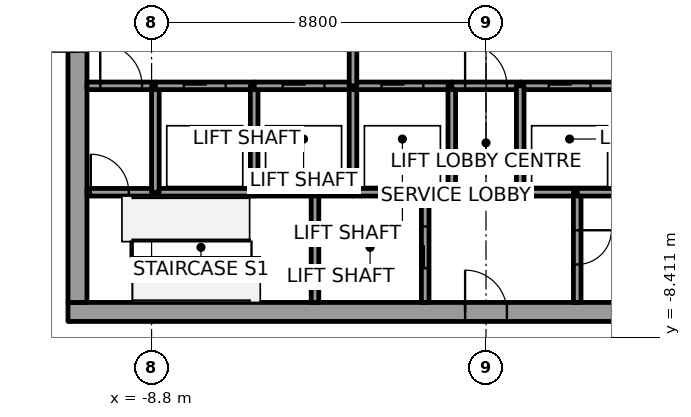
"""IFC4 building model, lengths in metres.
Left out: names, types, materials, properties, quantities, classifications, styles, units other than length and angle.
Written with IfcOpenShell. Run it as: python <this file> out.ifc"""

import sys

from ifc_helpers import new_model, si_unit, direction, frame, frame_2d, origin, place, context, subcontext, project, spatial, rectangle, extrude, element, fill, save


model = new_model("IFC4")
c1 = context("Model", 3, precision=1e-05, world=origin(), true_north=direction((0.0, 1.0)))
c2 = subcontext(c1, "Body", "Model", "MODEL_VIEW")
j1 = project(units=[si_unit("LENGTHUNIT", "METRE"), si_unit("PLANEANGLEUNIT", "RADIAN")], contexts=[c1])
p1 = place(None, origin())
s1 = spatial("IfcSite", under=j1, at=p1, CompositionType="ELEMENT")
p2 = place(p1, origin())
s2 = spatial("IfcBuilding", under=s1, at=p2, CompositionType="ELEMENT")
p3 = place(p2, frame((0.0, 0.0, 133.8)))
s3 = spatial("IfcBuildingStorey", under=s2, at=p3, CompositionType="ELEMENT", Elevation=133.8)
p4 = place(p3, frame((-11.0, -7.75, 0.0), z_axis=(0.0, 0.0, 1.0), x_axis=(1.0, 0.0, 0.0)))
e1 = element("IfcWall", 1, at=p4, inside=s3, PredefinedType="SHEAR", context=c2, shape_type="SweptSolid", body=[
    extrude(rectangle(XDim=22.0, YDim=0.5, at=frame_2d((11.0, 0.0))), origin(), (0.0, 0.0, 1.0), 4.0),
])
p5 = place(p4, frame((10.45, 0.0, 0.0)))
e2 = element("IfcOpeningElement", 2, at=p5, cuts=e1, PredefinedType="OPENING", context=c2, shape_type="SweptSolid", body=[
    extrude(rectangle(XDim=1.1, YDim=2.1, at=frame_2d((0.55, 1.05))), frame((0.0, 0.25, 0.0), z_axis=(0.0, -1.0, 0.0), x_axis=(1.0, 0.0, 0.0)), (0.0, 0.0, 1.0), 0.5),
])
p6 = place(p3, frame((-10.75, -7.5, 0.0), z_axis=(0.0, 0.0, 1.0), x_axis=(0.0, 1.0, 0.0)))
e3 = element("IfcWall", 3, at=p6, inside=s3, PredefinedType="SHEAR", context=c2, shape_type="SweptSolid", body=[
    extrude(rectangle(XDim=15.0, YDim=0.5, at=frame_2d((7.5, 0.0))), origin(), (0.0, 0.0, 1.0), 4.0),
])
p7 = place(p6, frame((6.6, 0.0, 0.0)))
e4 = element("IfcOpeningElement", 4, at=p7, cuts=e3, PredefinedType="OPENING", context=c2, shape_type="SweptSolid", body=[
    extrude(rectangle(XDim=1.8, YDim=2.1, at=frame_2d((0.9, 1.05))), frame((0.0, 0.25, 0.0), z_axis=(0.0, -1.0, 0.0), x_axis=(1.0, 0.0, 0.0)), (0.0, 0.0, 1.0), 0.5),
])
p8 = place(p3, frame((-10.5, -4.6, 0.0), z_axis=(0.0, 0.0, 1.0), x_axis=(1.0, 0.0, 0.0)))
e5 = element("IfcWall", 5, at=p8, inside=s3, PredefinedType="SOLIDWALL", context=c2, shape_type="SweptSolid", body=[
    extrude(rectangle(XDim=1.8, YDim=0.2, at=frame_2d((0.9, 0.0))), origin(), (0.0, 0.0, 1.0), 3.85),
])
p9 = place(p8, frame((0.1, 0.0, 0.0)))
e6 = element("IfcOpeningElement", 6, at=p9, cuts=e5, PredefinedType="OPENING", context=c2, shape_type="SweptSolid", body=[
    extrude(rectangle(XDim=1.0, YDim=2.1, at=frame_2d((0.5, 1.05))), frame((0.0, 0.1, 0.0), z_axis=(0.0, -1.0, 0.0), x_axis=(1.0, 0.0, 0.0)), (0.0, 0.0, 1.0), 0.2),
])
p10 = place(p3, frame((-10.5, -1.8, 0.0), z_axis=(0.0, 0.0, 1.0), x_axis=(1.0, 0.0, 0.0)))
e7 = element("IfcWall", 7, at=p10, inside=s3, PredefinedType="SOLIDWALL", context=c2, shape_type="SweptSolid", body=[
    extrude(rectangle(XDim=1.8, YDim=0.2, at=frame_2d((0.9, 0.0))), origin(), (0.0, 0.0, 1.0), 3.85),
])
p11 = place(p10, frame((0.35, 0.0, 0.0)))
e8 = element("IfcOpeningElement", 8, at=p11, cuts=e7, PredefinedType="OPENING", context=c2, shape_type="SweptSolid", body=[
    extrude(rectangle(XDim=1.1, YDim=2.1, at=frame_2d((0.55, 1.05))), frame((0.0, 0.1, 0.0), z_axis=(0.0, -1.0, 0.0), x_axis=(1.0, 0.0, 0.0)), (0.0, 0.0, 1.0), 0.2),
])
p12 = place(p3, frame((-8.7, -4.6, 0.0), z_axis=(0.0, 0.0, 1.0), x_axis=(1.0, 0.0, 0.0)))
e9 = element("IfcWall", 9, at=p12, inside=s3, PredefinedType="SOLIDWALL", context=c2, shape_type="SweptSolid", body=[
    extrude(rectangle(XDim=2.6, YDim=0.2, at=frame_2d((1.3, 0.0))), origin(), (0.0, 0.0, 1.0), 3.85),
])
p13 = place(p3, frame((-8.7, -4.6, 0.0), z_axis=(0.0, 0.0, 1.0), x_axis=(0.0, 1.0, 0.0)))
e10 = element("IfcWall", 10, at=p13, inside=s3, PredefinedType="SOLIDWALL", context=c2, shape_type="SweptSolid", body=[
    extrude(rectangle(XDim=2.8, YDim=0.2, at=frame_2d((1.4, 0.0))), origin(), (0.0, 0.0, 1.0), 3.85),
])
p14 = place(p3, frame((-8.7, -1.8, 0.0), z_axis=(0.0, 0.0, 1.0), x_axis=(1.0, 0.0, 0.0)))
e11 = element("IfcWall", 11, at=p14, inside=s3, PredefinedType="SOLIDWALL", context=c2, shape_type="SweptSolid", body=[
    extrude(rectangle(XDim=2.6, YDim=0.2, at=frame_2d((1.3, 0.0))), origin(), (0.0, 0.0, 1.0), 3.85),
])
p15 = place(p14, frame((0.75, 0.0, 0.0)))
e12 = element("IfcOpeningElement", 12, at=p15, cuts=e11, PredefinedType="OPENING", context=c2, shape_type="SweptSolid", body=[
    extrude(rectangle(XDim=1.1, YDim=2.1, at=frame_2d((0.55, 1.05))), frame((0.0, 0.1, 0.0), z_axis=(0.0, -1.0, 0.0), x_axis=(1.0, 0.0, 0.0)), (0.0, 0.0, 1.0), 0.2),
])
p16 = place(p3, frame((-6.1, -4.6, 0.0), z_axis=(0.0, 0.0, 1.0), x_axis=(1.0, 0.0, 0.0)))
e13 = element("IfcWall", 13, at=p16, inside=s3, PredefinedType="SOLIDWALL", context=c2, shape_type="SweptSolid", body=[
    extrude(rectangle(XDim=1.6, YDim=0.2, at=frame_2d((0.8, 0.0))), origin(), (0.0, 0.0, 1.0), 3.85),
])
p17 = place(p3, frame((-6.1, -4.6, 0.0), z_axis=(0.0, 0.0, 1.0), x_axis=(0.0, 1.0, 0.0)))
e14 = element("IfcWall", 14, at=p17, inside=s3, PredefinedType="SOLIDWALL", context=c2, shape_type="SweptSolid", body=[
    extrude(rectangle(XDim=2.8, YDim=0.2, at=frame_2d((1.4, 0.0))), origin(), (0.0, 0.0, 1.0), 3.85),
])
p18 = place(p3, frame((-6.1, -1.8, 0.0), z_axis=(0.0, 0.0, 1.0), x_axis=(1.0, 0.0, 0.0)))
e15 = element("IfcWall", 15, at=p18, inside=s3, PredefinedType="SOLIDWALL", context=c2, shape_type="SweptSolid", body=[
    extrude(rectangle(XDim=2.6, YDim=0.2, at=frame_2d((1.3, 0.0))), origin(), (0.0, 0.0, 1.0), 3.85),
])
p19 = place(p18, frame((0.75, 0.0, 0.0)))
e16 = element("IfcOpeningElement", 16, at=p19, cuts=e15, PredefinedType="OPENING", context=c2, shape_type="SweptSolid", body=[
    extrude(rectangle(XDim=1.1, YDim=2.1, at=frame_2d((0.55, 1.05))), frame((0.0, 0.1, 0.0), z_axis=(0.0, -1.0, 0.0), x_axis=(1.0, 0.0, 0.0)), (0.0, 0.0, 1.0), 0.2),
])
p20 = place(p3, frame((-4.5, -4.6, 0.0), z_axis=(0.0, 0.0, 1.0), x_axis=(0.0, -1.0, 0.0)))
e17 = element("IfcWall", 17, at=p20, inside=s3, PredefinedType="SOLIDWALL", context=c2, shape_type="SweptSolid", body=[
    extrude(rectangle(XDim=2.9, YDim=0.2, at=frame_2d((1.45, 0.0))), origin(), (0.0, 0.0, 1.0), 3.85),
])
p21 = place(p3, frame((-4.5, -4.6, 0.0), z_axis=(0.0, 0.0, 1.0), x_axis=(1.0, 0.0, 0.0)))
e18 = element("IfcWall", 18, at=p21, inside=s3, PredefinedType="SOLIDWALL", context=c2, shape_type="SweptSolid", body=[
    extrude(rectangle(XDim=1.0, YDim=0.2, at=frame_2d((0.5, 0.0))), origin(), (0.0, 0.0, 1.0), 3.85),
])
p22 = place(p3, frame((-3.5, -4.6, 0.0), z_axis=(0.0, 0.0, 1.0), x_axis=(1.0, 0.0, 0.0)))
e19 = element("IfcWall", 19, at=p22, inside=s3, PredefinedType="SOLIDWALL", context=c2, shape_type="SweptSolid", body=[
    extrude(rectangle(XDim=1.9, YDim=0.2, at=frame_2d((0.95, 0.0))), origin(), (0.0, 0.0, 1.0), 3.85),
])
p23 = place(p3, frame((-3.5, -4.6, 0.0), z_axis=(0.0, 0.0, 1.0), x_axis=(0.0, 1.0, 0.0)))
e20 = element("IfcWall", 20, at=p23, inside=s3, PredefinedType="SOLIDWALL", context=c2, shape_type="SweptSolid", body=[
    extrude(rectangle(XDim=2.8, YDim=0.2, at=frame_2d((1.4, 0.0))), origin(), (0.0, 0.0, 1.0), 3.85),
])
p24 = place(p3, frame((-3.5, -1.8, 0.0), z_axis=(0.0, 0.0, 1.0), x_axis=(1.0, 0.0, 0.0)))
e21 = element("IfcWall", 21, at=p24, inside=s3, PredefinedType="SOLIDWALL", context=c2, shape_type="SweptSolid", body=[
    extrude(rectangle(XDim=2.6, YDim=0.2, at=frame_2d((1.3, 0.0))), origin(), (0.0, 0.0, 1.0), 3.85),
])
p25 = place(p24, frame((0.75, 0.0, 0.0)))
e22 = element("IfcOpeningElement", 22, at=p25, cuts=e21, PredefinedType="OPENING", context=c2, shape_type="SweptSolid", body=[
    extrude(rectangle(XDim=1.1, YDim=2.1, at=frame_2d((0.55, 1.05))), frame((0.0, 0.1, 0.0), z_axis=(0.0, -1.0, 0.0), x_axis=(1.0, 0.0, 0.0)), (0.0, 0.0, 1.0), 0.2),
])
p26 = place(p3, frame((-3.5, 1.8, 0.0), z_axis=(0.0, 0.0, 1.0), x_axis=(0.0, -1.0, 0.0)))
e23 = element("IfcWall", 23, at=p26, inside=s3, PredefinedType="SOLIDWALL", context=c2, shape_type="SweptSolid", body=[
    extrude(rectangle(XDim=3.6, YDim=0.2, at=frame_2d((1.8, 0.0))), origin(), (0.0, 0.0, 1.0), 3.85),
])
p27 = place(p26, frame((1.05, 0.0, 0.0)))
e24 = element("IfcOpeningElement", 24, at=p27, cuts=e23, PredefinedType="OPENING", context=c2, shape_type="SweptSolid", body=[
    extrude(rectangle(XDim=1.5, YDim=2.1, at=frame_2d((0.75, 1.05))), frame((0.0, 0.1, 0.0), z_axis=(0.0, -1.0, 0.0), x_axis=(1.0, 0.0, 0.0)), (0.0, 0.0, 1.0), 0.2),
])
p28 = place(p3, frame((-1.6, -7.5, 0.0), z_axis=(0.0, 0.0, 1.0), x_axis=(0.0, 1.0, 0.0)))
e25 = element("IfcWall", 25, at=p28, inside=s3, PredefinedType="SOLIDWALL", context=c2, shape_type="SweptSolid", body=[
    extrude(rectangle(XDim=2.9, YDim=0.2, at=frame_2d((1.45, 0.0))), origin(), (0.0, 0.0, 1.0), 3.85),
])
p29 = place(p28, frame((0.9, 0.0, 0.0)))
e26 = element("IfcOpeningElement", 26, at=p29, cuts=e25, PredefinedType="OPENING", context=c2, shape_type="SweptSolid", body=[
    extrude(rectangle(XDim=1.1, YDim=2.1, at=frame_2d((0.55, 1.05))), frame((0.0, 0.1, 0.0), z_axis=(0.0, -1.0, 0.0), x_axis=(1.0, 0.0, 0.0)), (0.0, 0.0, 1.0), 0.2),
])
p30 = place(p3, frame((-1.6, -4.6, 0.0), z_axis=(0.0, 0.0, 1.0), x_axis=(1.0, 0.0, 0.0)))
e27 = element("IfcWall", 27, at=p30, inside=s3, PredefinedType="SOLIDWALL", context=c2, shape_type="SweptSolid", body=[
    extrude(rectangle(XDim=0.7, YDim=0.2, at=frame_2d((0.35, 0.0))), origin(), (0.0, 0.0, 1.0), 3.85),
])
p31 = place(p3, frame((-0.9, -4.6, 0.0), z_axis=(0.0, 0.0, 1.0), x_axis=(0.0, 1.0, 0.0)))
e28 = element("IfcWall", 28, at=p31, inside=s3, PredefinedType="SOLIDWALL", context=c2, shape_type="SweptSolid", body=[
    extrude(rectangle(XDim=2.8, YDim=0.2, at=frame_2d((1.4, 0.0))), origin(), (0.0, 0.0, 1.0), 3.85),
])
p32 = place(p3, frame((-0.9, -1.8, 0.0), z_axis=(0.0, 0.0, 1.0), x_axis=(1.0, 0.0, 0.0)))
e29 = element("IfcWall", 29, at=p32, inside=s3, PredefinedType="SOLIDWALL", context=c2, shape_type="SweptSolid", body=[
    extrude(rectangle(XDim=1.8, YDim=0.2, at=frame_2d((0.9, 0.0))), origin(), (0.0, 0.0, 1.0), 3.85),
])
p33 = place(p32, frame((0.35, 0.0, 0.0)))
e30 = element("IfcOpeningElement", 30, at=p33, cuts=e29, PredefinedType="OPENING", context=c2, shape_type="SweptSolid", body=[
    extrude(rectangle(XDim=1.1, YDim=2.1, at=frame_2d((0.55, 1.05))), frame((0.0, 0.1, 0.0), z_axis=(0.0, -1.0, 0.0), x_axis=(1.0, 0.0, 0.0)), (0.0, 0.0, 1.0), 0.2),
])
p34 = place(p3, frame((0.9, -1.8, 0.0), z_axis=(0.0, 0.0, 1.0), x_axis=(1.0, 0.0, 0.0)))
e31 = element("IfcWall", 31, at=p34, inside=s3, PredefinedType="SOLIDWALL", context=c2, shape_type="SweptSolid", body=[
    extrude(rectangle(XDim=2.6, YDim=0.2, at=frame_2d((1.3, 0.0))), origin(), (0.0, 0.0, 1.0), 3.85),
])
p35 = place(p34, frame((0.75, 0.0, 0.0)))
e32 = element("IfcOpeningElement", 32, at=p35, cuts=e31, PredefinedType="OPENING", context=c2, shape_type="SweptSolid", body=[
    extrude(rectangle(XDim=1.1, YDim=2.1, at=frame_2d((0.55, 1.05))), frame((0.0, 0.1, 0.0), z_axis=(0.0, -1.0, 0.0), x_axis=(1.0, 0.0, 0.0)), (0.0, 0.0, 1.0), 0.2),
])
p36 = place(p3, frame((0.9, -1.8, 0.0), z_axis=(0.0, 0.0, 1.0), x_axis=(0.0, -1.0, 0.0)))
e33 = element("IfcWall", 33, at=p36, inside=s3, PredefinedType="SOLIDWALL", context=c2, shape_type="SweptSolid", body=[
    extrude(rectangle(XDim=2.8, YDim=0.2, at=frame_2d((1.4, 0.0))), origin(), (0.0, 0.0, 1.0), 3.85),
])
p37 = place(p3, frame((0.9, -4.6, 0.0), z_axis=(0.0, 0.0, 1.0), x_axis=(1.0, 0.0, 0.0)))
e34 = element("IfcWall", 34, at=p37, inside=s3, PredefinedType="SOLIDWALL", context=c2, shape_type="SweptSolid", body=[
    extrude(rectangle(XDim=1.5, YDim=0.2, at=frame_2d((0.75, 0.0))), origin(), (0.0, 0.0, 1.0), 3.85),
])
p38 = place(p3, frame((2.4, -4.6, 0.0), z_axis=(0.0, 0.0, 1.0), x_axis=(0.0, -1.0, 0.0)))
e35 = element("IfcWall", 35, at=p38, inside=s3, PredefinedType="SOLIDWALL", context=c2, shape_type="SweptSolid", body=[
    extrude(rectangle(XDim=2.9, YDim=0.2, at=frame_2d((1.45, 0.0))), origin(), (0.0, 0.0, 1.0), 3.85),
])
p39 = place(p38, frame((1.0, 0.0, 0.0)))
e36 = element("IfcOpeningElement", 36, at=p39, cuts=e35, PredefinedType="OPENING", context=c2, shape_type="SweptSolid", body=[
    extrude(rectangle(XDim=0.9, YDim=2.1, at=frame_2d((0.45, 1.05))), frame((0.0, 0.1, 0.0), z_axis=(0.0, -1.0, 0.0), x_axis=(1.0, 0.0, 0.0)), (0.0, 0.0, 1.0), 0.2),
])
p40 = place(p3, frame((3.5, -4.6, 0.0), z_axis=(0.0, 0.0, 1.0), x_axis=(-1.0, 0.0, 0.0)))
e37 = element("IfcWall", 37, at=p40, inside=s3, PredefinedType="SOLIDWALL", context=c2, shape_type="SweptSolid", body=[
    extrude(rectangle(XDim=1.1, YDim=0.2, at=frame_2d((0.55, 0.0))), origin(), (0.0, 0.0, 1.0), 3.85),
])
p41 = place(p15, origin())
e38 = element("IfcDoor", 38, at=p41, inside=s3, OperationType="SLIDING_TO_RIGHT", PredefinedType="DOOR", context=c2, shape_type="SweptSolid", body=[
    extrude(rectangle(XDim=1.1, YDim=2.1, at=frame_2d((0.55, 1.05))), frame((0.0, 0.025, 0.0), z_axis=(0.0, -1.0, 0.0), x_axis=(1.0, 0.0, 0.0)), (0.0, 0.0, 1.0), 0.05),
])
fill(e12, e38)
p42 = place(p19, origin())
e39 = element("IfcDoor", 39, at=p42, inside=s3, OperationType="SLIDING_TO_LEFT", PredefinedType="DOOR", context=c2, shape_type="SweptSolid", body=[
    extrude(rectangle(XDim=1.1, YDim=2.1, at=frame_2d((0.55, 1.05))), frame((0.0, 0.025, 0.0), z_axis=(0.0, -1.0, 0.0), x_axis=(1.0, 0.0, 0.0)), (0.0, 0.0, 1.0), 0.05),
])
fill(e16, e39)
p43 = place(p25, origin())
e40 = element("IfcDoor", 40, at=p43, inside=s3, OperationType="SLIDING_TO_LEFT", PredefinedType="DOOR", context=c2, shape_type="SweptSolid", body=[
    extrude(rectangle(XDim=1.1, YDim=2.1, at=frame_2d((0.55, 1.05))), frame((0.0, 0.025, 0.0), z_axis=(0.0, -1.0, 0.0), x_axis=(1.0, 0.0, 0.0)), (0.0, 0.0, 1.0), 0.05),
])
fill(e22, e40)
p44 = place(p35, origin())
e41 = element("IfcDoor", 41, at=p44, inside=s3, OperationType="SLIDING_TO_LEFT", PredefinedType="DOOR", context=c2, shape_type="SweptSolid", body=[
    extrude(rectangle(XDim=1.1, YDim=2.1, at=frame_2d((0.55, 1.05))), frame((0.0, 0.025, 0.0), z_axis=(0.0, -1.0, 0.0), x_axis=(1.0, 0.0, 0.0)), (0.0, 0.0, 1.0), 0.05),
])
fill(e32, e41)
p45 = place(p29, origin())
e42 = element("IfcDoor", 42, at=p45, inside=s3, OperationType="SLIDING_TO_LEFT", PredefinedType="DOOR", context=c2, shape_type="SweptSolid", body=[
    extrude(rectangle(XDim=1.1, YDim=2.1, at=frame_2d((0.55, 1.05))), frame((0.0, 0.025, 0.0), z_axis=(0.0, -1.0, 0.0), x_axis=(1.0, 0.0, 0.0)), (0.0, 0.0, 1.0), 0.05),
])
fill(e26, e42)
p46 = place(p11, origin())
e43 = element("IfcDoor", 43, at=p46, inside=s3, OperationType="SINGLE_SWING_LEFT", PredefinedType="DOOR", context=c2, shape_type="SweptSolid", body=[
    extrude(rectangle(XDim=1.1, YDim=2.1, at=frame_2d((0.55, 1.05))), frame((0.0, 0.025, 0.0), z_axis=(0.0, -1.0, 0.0), x_axis=(1.0, 0.0, 0.0)), (0.0, 0.0, 1.0), 0.05),
])
fill(e8, e43)
p47 = place(p33, origin())
e44 = element("IfcDoor", 44, at=p47, inside=s3, OperationType="SINGLE_SWING_RIGHT", PredefinedType="DOOR", context=c2, shape_type="SweptSolid", body=[
    extrude(rectangle(XDim=1.1, YDim=2.1, at=frame_2d((0.55, 1.05))), frame((0.0, 0.025, 0.0), z_axis=(0.0, -1.0, 0.0), x_axis=(1.0, 0.0, 0.0)), (0.0, 0.0, 1.0), 0.05),
])
fill(e30, e44)
p48 = place(p9, origin())
e45 = element("IfcDoor", 45, at=p48, inside=s3, OperationType="SINGLE_SWING_LEFT", PredefinedType="DOOR", context=c2, shape_type="SweptSolid", body=[
    extrude(rectangle(XDim=1.0, YDim=2.1, at=frame_2d((0.5, 1.05))), frame((0.0, 0.025, 0.0), z_axis=(0.0, -1.0, 0.0), x_axis=(1.0, 0.0, 0.0)), (0.0, 0.0, 1.0), 0.05),
])
fill(e6, e45)
p49 = place(p39, origin())
e46 = element("IfcDoor", 46, at=p49, inside=s3, OperationType="SINGLE_SWING_RIGHT", PredefinedType="DOOR", context=c2, shape_type="SweptSolid", body=[
    extrude(rectangle(XDim=0.9, YDim=2.1, at=frame_2d((0.45, 1.05))), frame((0.0, 0.025, 0.0), z_axis=(0.0, -1.0, 0.0), x_axis=(1.0, 0.0, 0.0)), (0.0, 0.0, 1.0), 0.05),
])
fill(e36, e46)
p50 = place(p7, origin())
e47 = element("IfcDoor", 47, at=p50, inside=s3, OperationType="DOUBLE_DOOR_SINGLE_SWING", PredefinedType="DOOR", context=c2, shape_type="SweptSolid", body=[
    extrude(rectangle(XDim=1.8, YDim=2.1, at=frame_2d((0.9, 1.05))), frame((0.0, 0.025, 0.0), z_axis=(0.0, -1.0, 0.0), x_axis=(1.0, 0.0, 0.0)), (0.0, 0.0, 1.0), 0.05),
])
fill(e4, e47)
p51 = place(p5, origin())
e48 = element("IfcDoor", 48, at=p51, inside=s3, OperationType="SINGLE_SWING_RIGHT", PredefinedType="DOOR", context=c2, shape_type="SweptSolid", body=[
    extrude(rectangle(XDim=1.1, YDim=2.1, at=frame_2d((0.55, 1.05))), frame((0.0, 0.025, 0.0), z_axis=(0.0, -1.0, 0.0), x_axis=(1.0, 0.0, 0.0)), (0.0, 0.0, 1.0), 0.05),
])
fill(e2, e48)
save(model, sys.argv[1])
